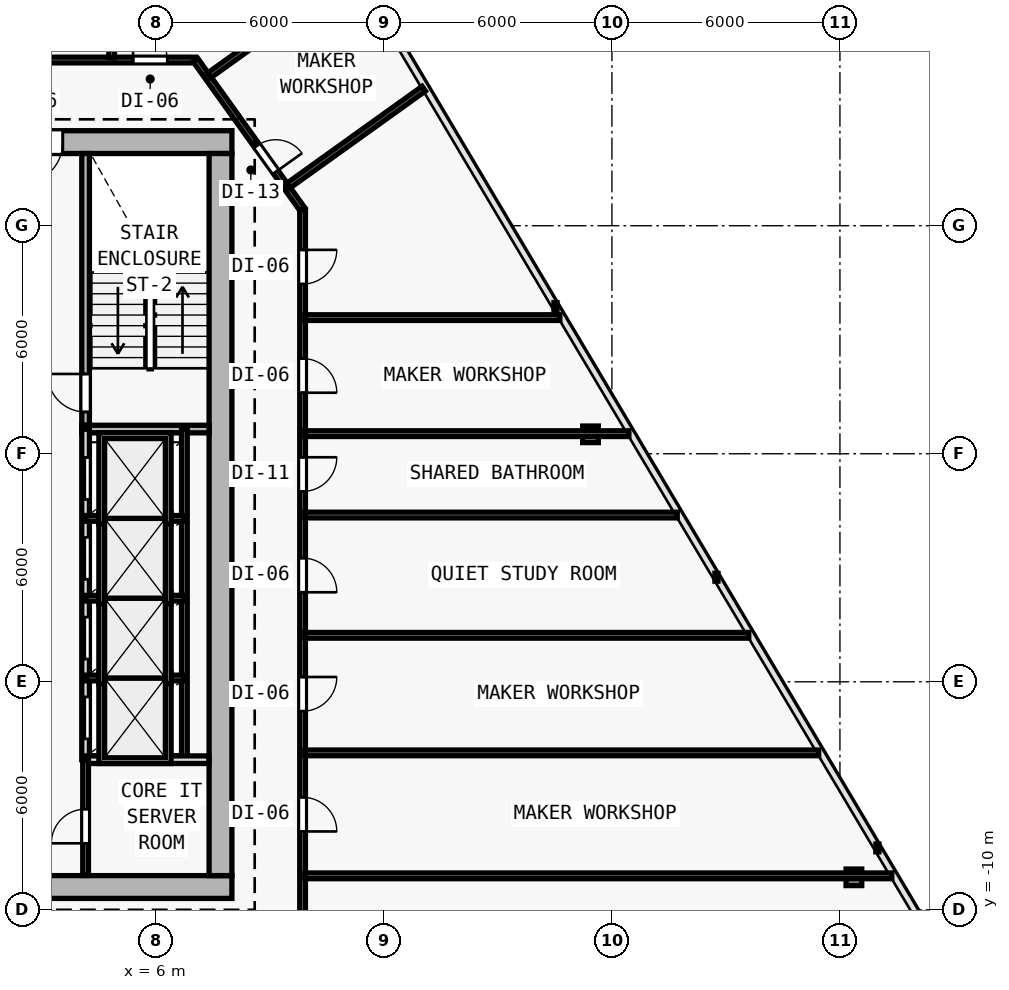
"""IFC4 building model, lengths in metres.
Left out: names, types, materials, properties, quantities, classifications, styles, units other than length and angle.
Written with IfcOpenShell. Run it as: python <this file> out.ifc"""

import sys

from ifc_helpers import new_model, si_unit, direction, frame, frame_2d, origin, origin_2d, place, context, subcontext, project, spatial, rectangle, i_section, extrude, element, fill, save


model = new_model("IFC4")
c1 = context("Model", 3, precision=1e-05, world=origin(), true_north=direction((0.0, 1.0)))
c2 = subcontext(c1, "Body", "Model", "MODEL_VIEW")
j1 = project(units=[si_unit("LENGTHUNIT", "METRE"), si_unit("PLANEANGLEUNIT", "RADIAN")], contexts=[c1])
p1 = place(None, origin())
s1 = spatial("IfcSite", under=j1, at=p1, CompositionType="ELEMENT")
p2 = place(p1, origin())
s2 = spatial("IfcBuilding", under=s1, at=p2, CompositionType="ELEMENT")
p3 = place(p2, frame((0.0, 0.0, 58.8)))
s3 = spatial("IfcBuildingStorey", under=s2, at=p3, CompositionType="ELEMENT", Elevation=58.8)
for number, where, z_axis, x_axis in (
    (1, (7.7, -9.4, 0.0), (0.0, 0.0, 1.0), (1.0, 0.0, 0.0)),
    (2, (7.7, 10.2, 0.0), (0.0, 0.0, 1.0), (1.0, 0.0, 0.0)),
    (3, (7.7, 0.4, 0.0), (0.0, 0.0, 1.0), (1.0, 0.0, 0.0)),
):
    element("IfcColumn", number, at=place(p3, frame(where, z_axis=z_axis, x_axis=x_axis)), inside=s3, PredefinedType="COLUMN", context=c2, shape_type="SweptSolid", body=[
        extrude(i_section(OverallWidth=0.416, OverallDepth=0.446, WebThickness=0.025, FlangeThickness=0.04, FilletRadius=0.015, at=origin_2d()), origin(), (0.0, 0.0, 1.0), 3.6),
    ])
p4 = place(p3, frame((24.367, -9.145, 0.005), z_axis=(-0.026105663043, 0.021618752208, 0.999425396871), x_axis=(-0.637813971185, -0.770190455771, 0.0)))
e4 = element("IfcColumn", 4, at=p4, inside=s3, PredefinedType="COLUMN", context=c2, shape_type="SweptSolid", body=[
    extrude(i_section(OverallWidth=0.412, OverallDepth=0.435, WebThickness=0.023, FlangeThickness=0.037, FilletRadius=0.015, at=origin_2d()), origin(), (0.0, 0.0, 1.0), 3.591),
])
p5 = place(p3, frame((17.436, 2.512, 0.005), z_axis=(-0.018906041, 0.009521027842, 0.999775930718), x_axis=(-0.449781931574, -0.893138406984, 0.0)))
e5 = element("IfcColumn", 5, at=p5, inside=s3, PredefinedType="COLUMN", context=c2, shape_type="SweptSolid", body=[
    extrude(i_section(OverallWidth=0.412, OverallDepth=0.435, WebThickness=0.023, FlangeThickness=0.037, FilletRadius=0.015, at=origin_2d()), origin(), (0.0, 0.0, 1.0), 3.59),
])
p6 = place(p3, frame((-8.0, -9.4, 0.0), z_axis=(0.0, 0.0, 1.0), x_axis=(1.0, 0.0, 0.0)))
e6 = element("IfcWall", 6, at=p6, inside=s3, PredefinedType="SHEAR", context=c2, shape_type="SweptSolid", body=[
    extrude(rectangle(XDim=16.0, YDim=0.6, at=frame_2d((8.0, 0.0))), origin(), (0.0, 0.0, 1.0), 3.35),
])
p7 = place(p6, frame((9.65, 0.0, 0.0)))
e7 = element("IfcOpeningElement", 7, at=p7, cuts=e6, PredefinedType="OPENING", context=c2, shape_type="SweptSolid", body=[
    extrude(rectangle(XDim=1.5, YDim=2.2, at=frame_2d((0.75, 1.1))), frame((0.0, 0.31, 0.0), z_axis=(0.0, -1.0, 0.0), x_axis=(1.0, 0.0, 0.0)), (0.0, 0.0, 1.0), 0.62),
])
p8 = place(p3, frame((8.0, 10.2, 0.0), z_axis=(0.0, 0.0, 1.0), x_axis=(-1.0, 0.0, 0.0)))
e8 = element("IfcWall", 8, at=p8, inside=s3, PredefinedType="SHEAR", context=c2, shape_type="SweptSolid", body=[
    extrude(rectangle(XDim=16.0, YDim=0.6, at=frame_2d((8.0, 0.0))), origin(), (0.0, 0.0, 1.0), 3.35),
])
p9 = place(p8, frame((4.45, 0.0, 0.0)))
e9 = element("IfcOpeningElement", 9, at=p9, cuts=e8, PredefinedType="OPENING", context=c2, shape_type="SweptSolid", body=[
    extrude(rectangle(XDim=1.1, YDim=2.15, at=frame_2d((0.55, 1.075))), frame((0.0, 0.31, 0.0), z_axis=(0.0, -1.0, 0.0), x_axis=(1.0, 0.0, 0.0)), (0.0, 0.0, 1.0), 0.62),
])
p10 = place(p3, frame((7.7, 9.9, 0.0), z_axis=(0.0, 0.0, 1.0), x_axis=(0.0, -1.0, 0.0)))
e10 = element("IfcWall", 10, at=p10, inside=s3, PredefinedType="SHEAR", context=c2, shape_type="SweptSolid", body=[
    extrude(rectangle(XDim=19.0, YDim=0.6, at=frame_2d((9.5, 0.0))), origin(), (0.0, 0.0, 1.0), 3.35),
])
p11 = place(p3, frame((4.15, 2.75, 0.0), z_axis=(0.0, 0.0, 1.0), x_axis=(0.0, 1.0, 0.0)))
e11 = element("IfcWall", 11, at=p11, inside=s3, PredefinedType="SOLIDWALL", context=c2, shape_type="SweptSolid", body=[
    extrude(rectangle(XDim=7.15, YDim=0.2, at=frame_2d((3.575, 0.0))), origin(), (0.0, 0.0, 1.0), 3.35),
])
p12 = place(p11, frame((0.35, 0.0, 0.0)))
e12 = element("IfcOpeningElement", 12, at=p12, cuts=e11, PredefinedType="OPENING", context=c2, shape_type="SweptSolid", body=[
    extrude(rectangle(XDim=1.0, YDim=2.15, at=frame_2d((0.5, 1.075))), frame((0.0, 0.11, 0.0), z_axis=(0.0, -1.0, 0.0), x_axis=(1.0, 0.0, 0.0)), (0.0, 0.0, 1.0), 0.22),
])
p13 = place(p3, frame((4.05, 2.65, 0.0), z_axis=(0.0, 0.0, 1.0), x_axis=(1.0, 0.0, 0.0)))
e13 = element("IfcWall", 13, at=p13, inside=s3, PredefinedType="SOLIDWALL", context=c2, shape_type="SweptSolid", body=[
    extrude(rectangle(XDim=3.35, YDim=0.2, at=frame_2d((1.675, 0.0))), origin(), (0.0, 0.0, 1.0), 3.35),
])
p14 = place(p3, frame((4.15, -6.05, 0.0), z_axis=(0.0, 0.0, 1.0), x_axis=(0.0, 1.0, 0.0)))
e14 = element("IfcWall", 14, at=p14, inside=s3, PredefinedType="SOLIDWALL", context=c2, shape_type="SweptSolid", body=[
    extrude(rectangle(XDim=8.7, YDim=0.2, at=frame_2d((4.35, 0.0))), origin(), (0.0, 0.0, 1.0), 3.35),
])
p15 = place(p14, frame((0.55, 0.0, 0.0)))
e15 = element("IfcOpeningElement", 15, at=p15, cuts=e14, PredefinedType="OPENING", context=c2, shape_type="SweptSolid", body=[
    extrude(rectangle(XDim=1.1, YDim=2.15, at=frame_2d((0.55, 1.075))), frame((0.0, 0.11, 0.0), z_axis=(0.0, -1.0, 0.0), x_axis=(1.0, 0.0, 0.0)), (0.0, 0.0, 1.0), 0.22),
])
p16 = place(p14, frame((2.65, 0.0, 0.0)))
e16 = element("IfcOpeningElement", 16, at=p16, cuts=e14, PredefinedType="OPENING", context=c2, shape_type="SweptSolid", body=[
    extrude(rectangle(XDim=1.1, YDim=2.15, at=frame_2d((0.55, 1.075))), frame((0.0, 0.11, 0.0), z_axis=(0.0, -1.0, 0.0), x_axis=(1.0, 0.0, 0.0)), (0.0, 0.0, 1.0), 0.22),
])
p17 = place(p14, frame((4.75, 0.0, 0.0)))
e17 = element("IfcOpeningElement", 17, at=p17, cuts=e14, PredefinedType="OPENING", context=c2, shape_type="SweptSolid", body=[
    extrude(rectangle(XDim=1.1, YDim=2.15, at=frame_2d((0.55, 1.075))), frame((0.0, 0.11, 0.0), z_axis=(0.0, -1.0, 0.0), x_axis=(1.0, 0.0, 0.0)), (0.0, 0.0, 1.0), 0.22),
])
p18 = place(p14, frame((6.85, 0.0, 0.0)))
e18 = element("IfcOpeningElement", 18, at=p18, cuts=e14, PredefinedType="OPENING", context=c2, shape_type="SweptSolid", body=[
    extrude(rectangle(XDim=1.1, YDim=2.15, at=frame_2d((0.55, 1.075))), frame((0.0, 0.11, 0.0), z_axis=(0.0, -1.0, 0.0), x_axis=(1.0, 0.0, 0.0)), (0.0, 0.0, 1.0), 0.22),
])
p19 = place(p3, frame((6.75, -6.05, 0.0), z_axis=(0.0, 0.0, 1.0), x_axis=(0.0, 1.0, 0.0)))
e19 = element("IfcWall", 19, at=p19, inside=s3, PredefinedType="PARTITIONING", context=c2, shape_type="SweptSolid", body=[
    extrude(rectangle(XDim=8.7, YDim=0.15, at=frame_2d((4.35, 0.0))), origin(), (0.0, 0.0, 1.0), 3.35),
])
for number, where, z_axis, x_axis in (
    (20, (4.15, -3.9, 0.0), (0.0, 0.0, 1.0), (1.0, 0.0, 0.0)),
    (21, (4.15, -1.8, 0.0), (0.0, 0.0, 1.0), (1.0, 0.0, 0.0)),
    (22, (4.15, 0.3, 0.0), (0.0, 0.0, 1.0), (1.0, 0.0, 0.0)),
):
    element("IfcWall", number, at=place(p3, frame(where, z_axis=z_axis, x_axis=x_axis)), inside=s3, PredefinedType="PARTITIONING", context=c2, shape_type="SweptSolid", body=[
        extrude(rectangle(XDim=2.6, YDim=0.15, at=frame_2d((1.3, 0.0))), origin(), (0.0, 0.0, 1.0), 3.35),
    ])
p20 = place(p3, frame((4.15, -6.05, 0.0), z_axis=(0.0, 0.0, 1.0), x_axis=(1.0, 0.0, 0.0)))
e23 = element("IfcWall", 23, at=p20, inside=s3, PredefinedType="SOLIDWALL", context=c2, shape_type="SweptSolid", body=[
    extrude(rectangle(XDim=3.245, YDim=0.2, at=frame_2d((1.623, 0.0))), origin(), (0.0, 0.0, 1.0), 3.35),
])
p21 = place(p3, frame((4.15, -9.095, 0.0), z_axis=(0.0, 0.0, 1.0), x_axis=(0.0, 1.0, 0.0)))
e24 = element("IfcWall", 24, at=p21, inside=s3, PredefinedType="PARTITIONING", context=c2, shape_type="SweptSolid", body=[
    extrude(rectangle(XDim=3.045, YDim=0.15, at=frame_2d((1.522, 0.0))), origin(), (0.0, 0.0, 1.0), 3.35),
])
p22 = place(p21, frame((0.845, 0.0, 0.0)))
e25 = element("IfcOpeningElement", 25, at=p22, cuts=e24, PredefinedType="OPENING", context=c2, shape_type="SweptSolid", body=[
    extrude(rectangle(XDim=0.9, YDim=2.1, at=frame_2d((0.45, 1.05))), frame((0.0, 0.085, 0.0), z_axis=(0.0, -1.0, 0.0), x_axis=(1.0, 0.0, 0.0)), (0.0, 0.0, 1.0), 0.17),
])
p23 = place(p3, frame((-7.041, 12.36, 0.0), z_axis=(0.0, 0.0, 1.0), x_axis=(1.0, 0.0, 0.0)))
e26 = element("IfcWall", 26, at=p23, inside=s3, PredefinedType="PARTITIONING", context=c2, shape_type="SweptSolid", body=[
    extrude(rectangle(XDim=14.082, YDim=0.15, at=frame_2d((7.041, 0.0))), origin(), (0.0, 0.0, 1.0), 3.35),
])
p24 = place(p23, frame((12.441, 0.0, 0.0)))
e27 = element("IfcOpeningElement", 27, at=p24, cuts=e26, PredefinedType="OPENING", context=c2, shape_type="SweptSolid", body=[
    extrude(rectangle(XDim=0.9, YDim=2.1, at=frame_2d((0.45, 1.05))), frame((0.0, 0.085, 0.0), z_axis=(0.0, -1.0, 0.0), x_axis=(1.0, 0.0, 0.0)), (0.0, 0.0, 1.0), 0.17),
])
p25 = place(p23, frame((9.226, 0.0, 0.0)))
e28 = element("IfcOpeningElement", 28, at=p25, cuts=e26, PredefinedType="OPENING", context=c2, shape_type="SweptSolid", body=[
    extrude(rectangle(XDim=0.9, YDim=2.1, at=frame_2d((0.45, 1.05))), frame((0.0, 0.085, 0.0), z_axis=(0.0, -1.0, 0.0), x_axis=(1.0, 0.0, 0.0)), (0.0, 0.0, 1.0), 0.17),
])
p26 = place(p23, frame((4.862, 0.0, 0.0)))
e29 = element("IfcOpeningElement", 29, at=p26, cuts=e26, PredefinedType="OPENING", context=c2, shape_type="SweptSolid", body=[
    extrude(rectangle(XDim=0.9, YDim=2.1, at=frame_2d((0.45, 1.05))), frame((0.0, 0.085, 0.0), z_axis=(0.0, -1.0, 0.0), x_axis=(1.0, 0.0, 0.0)), (0.0, 0.0, 1.0), 0.17),
])
p27 = place(p23, frame((1.214, 0.0, 0.0)))
e30 = element("IfcOpeningElement", 30, at=p27, cuts=e26, PredefinedType="OPENING", context=c2, shape_type="SweptSolid", body=[
    extrude(rectangle(XDim=0.9, YDim=2.1, at=frame_2d((0.45, 1.05))), frame((0.0, 0.085, 0.0), z_axis=(0.0, -1.0, 0.0), x_axis=(1.0, 0.0, 0.0)), (0.0, 0.0, 1.0), 0.17),
])
p28 = place(p3, frame((7.041, 12.36, 0.0), z_axis=(0.0, 0.0, 1.0), x_axis=(0.582449511476, -0.812866881218, 0.0)))
e31 = element("IfcWall", 31, at=p28, inside=s3, PredefinedType="PARTITIONING", context=c2, shape_type="SweptSolid", body=[
    extrude(rectangle(XDim=4.84, YDim=0.15, at=frame_2d((2.42, 0.0))), origin(), (0.0, 0.0, 1.0), 2.725),
])
p29 = place(p28, frame((2.775, 0.0, 0.0)))
e32 = element("IfcOpeningElement", 32, at=p29, cuts=e31, PredefinedType="OPENING", context=c2, shape_type="SweptSolid", body=[
    extrude(rectangle(XDim=0.85, YDim=2.1, at=frame_2d((0.425, 1.05))), frame((0.0, 0.085, 0.0), z_axis=(0.0, -1.0, 0.0), x_axis=(1.0, 0.0, 0.0)), (0.0, 0.0, 1.0), 0.17),
])
p30 = place(p3, frame((9.86, 8.426, 0.0), z_axis=(0.0, 0.0, 1.0), x_axis=(0.0, -1.0, 0.0)))
e33 = element("IfcWall", 33, at=p30, inside=s3, PredefinedType="PARTITIONING", context=c2, shape_type="SweptSolid", body=[
    extrude(rectangle(XDim=19.986, YDim=0.15, at=frame_2d((9.993, 0.0))), origin(), (0.0, 0.0, 1.0), 2.609),
])
p31 = place(p30, frame((15.464, 0.0, 0.0)))
e34 = element("IfcOpeningElement", 34, at=p31, cuts=e33, PredefinedType="OPENING", context=c2, shape_type="SweptSolid", body=[
    extrude(rectangle(XDim=0.9, YDim=2.1, at=frame_2d((0.45, 1.05))), frame((0.0, 0.085, 0.0), z_axis=(0.0, -1.0, 0.0), x_axis=(1.0, 0.0, 0.0)), (0.0, 0.0, 1.0), 0.17),
])
p32 = place(p30, frame((12.299, 0.0, 0.0)))
e35 = element("IfcOpeningElement", 35, at=p32, cuts=e33, PredefinedType="OPENING", context=c2, shape_type="SweptSolid", body=[
    extrude(rectangle(XDim=0.9, YDim=2.1, at=frame_2d((0.45, 1.05))), frame((0.0, 0.085, 0.0), z_axis=(0.0, -1.0, 0.0), x_axis=(1.0, 0.0, 0.0)), (0.0, 0.0, 1.0), 0.17),
])
p33 = place(p30, frame((9.17, 0.0, 0.0)))
e36 = element("IfcOpeningElement", 36, at=p33, cuts=e33, PredefinedType="OPENING", context=c2, shape_type="SweptSolid", body=[
    extrude(rectangle(XDim=0.9, YDim=2.1, at=frame_2d((0.45, 1.05))), frame((0.0, 0.085, 0.0), z_axis=(0.0, -1.0, 0.0), x_axis=(1.0, 0.0, 0.0)), (0.0, 0.0, 1.0), 0.17),
])
p34 = place(p30, frame((6.518, 0.0, 0.0)))
e37 = element("IfcOpeningElement", 37, at=p34, cuts=e33, PredefinedType="OPENING", context=c2, shape_type="SweptSolid", body=[
    extrude(rectangle(XDim=0.9, YDim=2.1, at=frame_2d((0.45, 1.05))), frame((0.0, 0.085, 0.0), z_axis=(0.0, -1.0, 0.0), x_axis=(1.0, 0.0, 0.0)), (0.0, 0.0, 1.0), 0.17),
])
p35 = place(p30, frame((3.92, 0.0, 0.0)))
e38 = element("IfcOpeningElement", 38, at=p35, cuts=e33, PredefinedType="OPENING", context=c2, shape_type="SweptSolid", body=[
    extrude(rectangle(XDim=0.9, YDim=2.1, at=frame_2d((0.45, 1.05))), frame((0.0, 0.085, 0.0), z_axis=(0.0, -1.0, 0.0), x_axis=(1.0, 0.0, 0.0)), (0.0, 0.0, 1.0), 0.17),
])
p36 = place(p30, frame((1.061, 0.0, 0.0)))
e39 = element("IfcOpeningElement", 39, at=p36, cuts=e33, PredefinedType="OPENING", context=c2, shape_type="SweptSolid", body=[
    extrude(rectangle(XDim=0.9, YDim=2.1, at=frame_2d((0.45, 1.05))), frame((0.0, 0.085, 0.0), z_axis=(0.0, -1.0, 0.0), x_axis=(1.0, 0.0, 0.0)), (0.0, 0.0, 1.0), 0.17),
])
p37 = place(p3, frame((9.92, -9.106, 0.0), z_axis=(0.0, 0.0, 1.0), x_axis=(1.0, 0.0, 0.0)))
e40 = element("IfcWall", 40, at=p37, inside=s3, PredefinedType="PARTITIONING", context=c2, shape_type="SweptSolid", body=[
    extrude(rectangle(XDim=15.444, YDim=0.15, at=frame_2d((7.722, 0.0))), origin(), (0.0, 0.0, 1.0), 2.609),
])
p38 = place(p3, frame((9.92, 2.529, 0.0), z_axis=(0.0, 0.0, 1.0), x_axis=(1.0, 0.0, 0.0)))
e41 = element("IfcWall", 41, at=p38, inside=s3, PredefinedType="PARTITIONING", context=c2, shape_type="SweptSolid", body=[
    extrude(rectangle(XDim=8.526, YDim=0.15, at=frame_2d((4.263, 0.0))), origin(), (0.0, 0.0, 1.0), 2.735),
])
p39 = place(p3, frame((7.404, 11.957, 0.0), z_axis=(0.0, 0.0, 1.0), x_axis=(0.812874232522, 0.582439251856, 0.0)))
e42 = element("IfcWall", 42, at=p39, inside=s3, PredefinedType="PARTITIONING", context=c2, shape_type="SweptSolid", body=[
    extrude(rectangle(XDim=4.689, YDim=0.15, at=frame_2d((2.345, 0.0))), origin(), (0.0, 0.0, 1.0), 2.725),
])
p40 = place(p3, frame((9.92, -2.777, 0.0), z_axis=(0.0, 0.0, 1.0), x_axis=(1.0, 0.0, 0.0)))
e43 = element("IfcWall", 43, at=p40, inside=s3, PredefinedType="PARTITIONING", context=c2, shape_type="SweptSolid", body=[
    extrude(rectangle(XDim=11.681, YDim=0.15, at=frame_2d((5.84, 0.0))), origin(), (0.0, 0.0, 1.0), 2.735),
])
p41 = place(p3, frame((9.485, 9.052, 0.0), z_axis=(0.0, 0.0, 1.0), x_axis=(0.812874691843, 0.582438610809, 0.0)))
e44 = element("IfcWall", 44, at=p41, inside=s3, PredefinedType="PARTITIONING", context=c2, shape_type="SweptSolid", body=[
    extrude(rectangle(XDim=4.384, YDim=0.15, at=frame_2d((2.192, 0.0))), origin(), (0.0, 0.0, 1.0), 2.735),
])
p42 = place(p3, frame((9.92, -5.871, 0.0), z_axis=(0.0, 0.0, 1.0), x_axis=(1.0, 0.0, 0.0)))
e45 = element("IfcWall", 45, at=p42, inside=s3, PredefinedType="PARTITIONING", context=c2, shape_type="SweptSolid", body=[
    extrude(rectangle(XDim=13.52, YDim=0.15, at=frame_2d((6.76, 0.0))), origin(), (0.0, 0.0, 1.0), 2.735),
])
p43 = place(p3, frame((9.92, 0.388, 0.0), z_axis=(0.0, 0.0, 1.0), x_axis=(1.0, 0.0, 0.0)))
e46 = element("IfcWall", 46, at=p43, inside=s3, PredefinedType="PARTITIONING", context=c2, shape_type="SweptSolid", body=[
    extrude(rectangle(XDim=9.799, YDim=0.15, at=frame_2d((4.899, 0.0))), origin(), (0.0, 0.0, 1.0), 2.735),
])
p44 = place(p3, frame((9.92, 5.583, 0.0), z_axis=(0.0, 0.0, 1.0), x_axis=(1.0, 0.0, 0.0)))
e47 = element("IfcWall", 47, at=p44, inside=s3, PredefinedType="PARTITIONING", context=c2, shape_type="SweptSolid", body=[
    extrude(rectangle(XDim=6.71, YDim=0.15, at=frame_2d((3.355, 0.0))), origin(), (0.0, 0.0, 1.0), 2.735),
])
p45 = place(p3, frame((4.836, 12.42, 0.0), z_axis=(0.0, 0.0, 1.0), x_axis=(0.0, 1.0, 0.0)))
e48 = element("IfcWall", 48, at=p45, inside=s3, PredefinedType="PARTITIONING", context=c2, shape_type="SweptSolid", body=[
    extrude(rectangle(XDim=9.776, YDim=0.15, at=frame_2d((4.888, 0.0))), origin(), (0.0, 0.0, 1.0), 2.735),
])
p46 = place(p9, origin())
e49 = element("IfcDoor", 49, at=p46, inside=s3, OperationType="SINGLE_SWING_RIGHT", PredefinedType="DOOR", context=c2, shape_type="SweptSolid", body=[
    extrude(rectangle(XDim=1.1, YDim=2.15, at=frame_2d((0.55, 1.075))), frame((0.0, 0.025, 0.0), z_axis=(0.0, -1.0, 0.0), x_axis=(1.0, 0.0, 0.0)), (0.0, 0.0, 1.0), 0.05),
])
fill(e9, e49)
p47 = place(p12, origin())
e50 = element("IfcDoor", 50, at=p47, inside=s3, OperationType="SINGLE_SWING_RIGHT", PredefinedType="DOOR", context=c2, shape_type="SweptSolid", body=[
    extrude(rectangle(XDim=1.0, YDim=2.15, at=frame_2d((0.5, 1.075))), frame((0.0, 0.025, 0.0), z_axis=(0.0, -1.0, 0.0), x_axis=(1.0, 0.0, 0.0)), (0.0, 0.0, 1.0), 0.05),
])
fill(e12, e50)
p48 = place(p15, origin())
e51 = element("IfcDoor", 51, at=p48, inside=s3, OperationType="DOUBLE_DOOR_SLIDING", PredefinedType="DOOR", context=c2, shape_type="SweptSolid", body=[
    extrude(rectangle(XDim=1.1, YDim=2.15, at=frame_2d((0.55, 1.075))), frame((0.0, 0.025, 0.0), z_axis=(0.0, -1.0, 0.0), x_axis=(1.0, 0.0, 0.0)), (0.0, 0.0, 1.0), 0.05),
])
fill(e15, e51)
p49 = place(p16, origin())
e52 = element("IfcDoor", 52, at=p49, inside=s3, OperationType="DOUBLE_DOOR_SLIDING", PredefinedType="DOOR", context=c2, shape_type="SweptSolid", body=[
    extrude(rectangle(XDim=1.1, YDim=2.15, at=frame_2d((0.55, 1.075))), frame((0.0, 0.025, 0.0), z_axis=(0.0, -1.0, 0.0), x_axis=(1.0, 0.0, 0.0)), (0.0, 0.0, 1.0), 0.05),
])
fill(e16, e52)
p50 = place(p17, origin())
e53 = element("IfcDoor", 53, at=p50, inside=s3, OperationType="DOUBLE_DOOR_SLIDING", PredefinedType="DOOR", context=c2, shape_type="SweptSolid", body=[
    extrude(rectangle(XDim=1.1, YDim=2.15, at=frame_2d((0.55, 1.075))), frame((0.0, 0.025, 0.0), z_axis=(0.0, -1.0, 0.0), x_axis=(1.0, 0.0, 0.0)), (0.0, 0.0, 1.0), 0.05),
])
fill(e17, e53)
p51 = place(p18, origin())
e54 = element("IfcDoor", 54, at=p51, inside=s3, OperationType="DOUBLE_DOOR_SLIDING", PredefinedType="DOOR", context=c2, shape_type="SweptSolid", body=[
    extrude(rectangle(XDim=1.1, YDim=2.15, at=frame_2d((0.55, 1.075))), frame((0.0, 0.025, 0.0), z_axis=(0.0, -1.0, 0.0), x_axis=(1.0, 0.0, 0.0)), (0.0, 0.0, 1.0), 0.05),
])
fill(e18, e54)
p52 = place(p22, origin())
e55 = element("IfcDoor", 55, at=p52, inside=s3, OperationType="SINGLE_SWING_LEFT", PredefinedType="DOOR", context=c2, shape_type="SweptSolid", body=[
    extrude(rectangle(XDim=0.9, YDim=2.1, at=frame_2d((0.45, 1.05))), frame((0.0, 0.025, 0.0), z_axis=(0.0, -1.0, 0.0), x_axis=(1.0, 0.0, 0.0)), (0.0, 0.0, 1.0), 0.05),
])
fill(e25, e55)
p53 = place(p31, origin())
e56 = element("IfcDoor", 56, at=p53, inside=s3, OperationType="SINGLE_SWING_RIGHT", PredefinedType="DOOR", context=c2, shape_type="SweptSolid", body=[
    extrude(rectangle(XDim=0.9, YDim=2.1, at=frame_2d((0.45, 1.05))), frame((0.0, 0.025, 0.0), z_axis=(0.0, -1.0, 0.0), x_axis=(1.0, 0.0, 0.0)), (0.0, 0.0, 1.0), 0.05),
])
fill(e34, e56)
p54 = place(p32, origin())
e57 = element("IfcDoor", 57, at=p54, inside=s3, OperationType="SINGLE_SWING_LEFT", PredefinedType="DOOR", context=c2, shape_type="SweptSolid", body=[
    extrude(rectangle(XDim=0.9, YDim=2.1, at=frame_2d((0.45, 1.05))), frame((0.0, 0.025, 0.0), z_axis=(0.0, -1.0, 0.0), x_axis=(1.0, 0.0, 0.0)), (0.0, 0.0, 1.0), 0.05),
])
fill(e35, e57)
p55 = place(p33, origin())
e58 = element("IfcDoor", 58, at=p55, inside=s3, OperationType="SINGLE_SWING_RIGHT", PredefinedType="DOOR", context=c2, shape_type="SweptSolid", body=[
    extrude(rectangle(XDim=0.9, YDim=2.1, at=frame_2d((0.45, 1.05))), frame((0.0, 0.025, 0.0), z_axis=(0.0, -1.0, 0.0), x_axis=(1.0, 0.0, 0.0)), (0.0, 0.0, 1.0), 0.05),
])
fill(e36, e58)
p56 = place(p34, origin())
e59 = element("IfcDoor", 59, at=p56, inside=s3, OperationType="SINGLE_SWING_LEFT", PredefinedType="DOOR", context=c2, shape_type="SweptSolid", body=[
    extrude(rectangle(XDim=0.9, YDim=2.1, at=frame_2d((0.45, 1.05))), frame((0.0, 0.025, 0.0), z_axis=(0.0, -1.0, 0.0), x_axis=(1.0, 0.0, 0.0)), (0.0, 0.0, 1.0), 0.05),
])
fill(e37, e59)
p57 = place(p35, origin())
e60 = element("IfcDoor", 60, at=p57, inside=s3, OperationType="SINGLE_SWING_RIGHT", PredefinedType="DOOR", context=c2, shape_type="SweptSolid", body=[
    extrude(rectangle(XDim=0.9, YDim=2.1, at=frame_2d((0.45, 1.05))), frame((0.0, 0.025, 0.0), z_axis=(0.0, -1.0, 0.0), x_axis=(1.0, 0.0, 0.0)), (0.0, 0.0, 1.0), 0.05),
])
fill(e38, e60)
p58 = place(p36, origin())
e61 = element("IfcDoor", 61, at=p58, inside=s3, OperationType="SINGLE_SWING_LEFT", PredefinedType="DOOR", context=c2, shape_type="SweptSolid", body=[
    extrude(rectangle(XDim=0.9, YDim=2.1, at=frame_2d((0.45, 1.05))), frame((0.0, 0.025, 0.0), z_axis=(0.0, -1.0, 0.0), x_axis=(1.0, 0.0, 0.0)), (0.0, 0.0, 1.0), 0.05),
])
fill(e39, e61)
p59 = place(p29, origin())
e62 = element("IfcDoor", 62, at=p59, inside=s3, OperationType="SINGLE_SWING_RIGHT", PredefinedType="DOOR", context=c2, shape_type="SweptSolid", body=[
    extrude(rectangle(XDim=0.85, YDim=2.1, at=frame_2d((0.425, 1.05))), frame((0.0, 0.025, 0.0), z_axis=(0.0, -1.0, 0.0), x_axis=(1.0, 0.0, 0.0)), (0.0, 0.0, 1.0), 0.05),
])
fill(e32, e62)
p60 = place(p24, origin())
e63 = element("IfcDoor", 63, at=p60, inside=s3, OperationType="SINGLE_SWING_LEFT", PredefinedType="DOOR", context=c2, shape_type="SweptSolid", body=[
    extrude(rectangle(XDim=0.9, YDim=2.1, at=frame_2d((0.45, 1.05))), frame((0.0, 0.025, 0.0), z_axis=(0.0, -1.0, 0.0), x_axis=(1.0, 0.0, 0.0)), (0.0, 0.0, 1.0), 0.05),
])
fill(e27, e63)
save(model, sys.argv[1])
